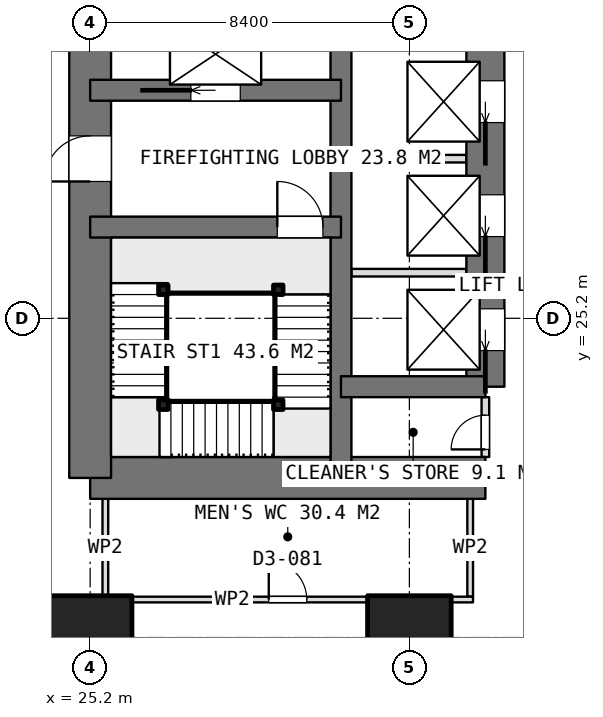
"""IFC4 building model, lengths in metres.
Left out: names, types, materials, properties, quantities, classifications, styles, units other than length and angle.
Written with IfcOpenShell. Run it as: python <this file> out.ifc"""

import sys

from ifc_helpers import new_model, si_unit, direction, frame, frame_2d, origin, origin_2d, place, context, subcontext, project, spatial, rectangle, extrude, element, fill, save


model = new_model("IFC4")
c1 = context("Model", 3, precision=1e-05, world=origin(), true_north=direction((0.0, 1.0)))
c2 = subcontext(c1, "Body", "Model", "MODEL_VIEW")
j1 = project(units=[si_unit("LENGTHUNIT", "METRE"), si_unit("PLANEANGLEUNIT", "RADIAN")], contexts=[c1])
p1 = place(None, origin())
s1 = spatial("IfcSite", under=j1, at=p1, CompositionType="ELEMENT")
p2 = place(p1, origin())
s2 = spatial("IfcBuilding", under=s1, at=p2, CompositionType="ELEMENT")
p3 = place(p2, frame((0.0, 0.0, 74.15)))
s3 = spatial("IfcBuildingStorey", under=s2, at=p3, CompositionType="ELEMENT", Elevation=74.15)
p4 = place(p3, frame((25.2, 21.0, 0.0), z_axis=(0.0, 0.0, 1.0), x_axis=(1.0, 0.0, 0.0)))
e1 = element("IfcWall", 1, at=p4, inside=s3, PredefinedType="SHEAR", context=c2, shape_type="SweptSolid", body=[
    extrude(rectangle(XDim=10.4, YDim=1.1, at=frame_2d((5.2, 0.0))), origin(), (0.0, 0.0, 1.0), 3.75),
])
p5 = place(p3, frame((25.2, 21.0, 0.0), z_axis=(0.0, 0.0, 1.0), x_axis=(0.0, 1.0, 0.0)))
e2 = element("IfcWall", 2, at=p5, inside=s3, PredefinedType="SHEAR", context=c2, shape_type="SweptSolid", body=[
    extrude(rectangle(XDim=25.2, YDim=1.1, at=frame_2d((12.6, 0.0))), origin(), (0.0, 0.0, 1.0), 3.75),
])
p6 = place(p5, frame((7.8, 0.0, 0.0)))
e3 = element("IfcOpeningElement", 3, at=p6, cuts=e2, PredefinedType="OPENING", context=c2, shape_type="SweptSolid", body=[
    extrude(rectangle(XDim=1.2, YDim=2.1, at=frame_2d((0.6, 1.05))), frame((0.0, 0.56, 0.0), z_axis=(0.0, -1.0, 0.0), x_axis=(1.0, 0.0, 0.0)), (0.0, 0.0, 1.0), 1.12),
])
p7 = place(p5, frame((14.25, 0.0, 0.0)))
e4 = element("IfcOpeningElement", 4, at=p7, cuts=e2, PredefinedType="OPENING", context=c2, shape_type="SweptSolid", body=[
    extrude(rectangle(XDim=0.9, YDim=2.1, at=frame_2d((0.45, 1.05))), frame((0.0, 0.56, 0.0), z_axis=(0.0, -1.0, 0.0), x_axis=(1.0, 0.0, 0.0)), (0.0, 0.0, 1.0), 1.12),
])
p8 = place(p5, frame((16.85, 0.0, 0.0)))
e5 = element("IfcOpeningElement", 5, at=p8, cuts=e2, PredefinedType="OPENING", context=c2, shape_type="SweptSolid", body=[
    extrude(rectangle(XDim=0.9, YDim=2.1, at=frame_2d((0.45, 1.05))), frame((0.0, 0.56, 0.0), z_axis=(0.0, -1.0, 0.0), x_axis=(1.0, 0.0, 0.0)), (0.0, 0.0, 1.0), 1.12),
])
p9 = place(p5, frame((19.075, 0.0, 0.0)))
e6 = element("IfcOpeningElement", 6, at=p9, cuts=e2, PredefinedType="OPENING", context=c2, shape_type="SweptSolid", body=[
    extrude(rectangle(XDim=1.2, YDim=2.1, at=frame_2d((0.6, 1.05))), frame((0.0, 0.56, 0.0), z_axis=(0.0, -1.0, 0.0), x_axis=(1.0, 0.0, 0.0)), (0.0, 0.0, 1.0), 1.12),
])
p10 = place(p3, frame((31.8, 21.0, 0.0), z_axis=(0.0, 0.0, 1.0), x_axis=(0.0, 1.0, 0.0)))
e7 = element("IfcWall", 7, at=p10, inside=s3, PredefinedType="SHEAR", context=c2, shape_type="SweptSolid", body=[
    extrude(rectangle(XDim=25.2, YDim=0.55, at=frame_2d((12.6, 0.0))), origin(), (0.0, 0.0, 1.0), 3.75),
])
p11 = place(p3, frame((35.6, 23.4, 0.0), z_axis=(0.0, 0.0, 1.0), x_axis=(0.0, 1.0, 0.0)))
e8 = element("IfcWall", 8, at=p11, inside=s3, PredefinedType="SHEAR", context=c2, shape_type="SweptSolid", body=[
    extrude(rectangle(XDim=18.0, YDim=1.0, at=frame_2d((9.0, 0.0))), origin(), (0.0, 0.0, 1.0), 3.75),
])
p12 = place(p11, frame((0.95, 0.0, 0.0)))
e9 = element("IfcOpeningElement", 9, at=p12, cuts=e8, PredefinedType="OPENING", context=c2, shape_type="SweptSolid", body=[
    extrude(rectangle(XDim=1.1, YDim=2.1, at=frame_2d((0.55, 1.05))), frame((0.0, 0.51, 0.0), z_axis=(0.0, -1.0, 0.0), x_axis=(1.0, 0.0, 0.0)), (0.0, 0.0, 1.0), 1.02),
])
p13 = place(p11, frame((3.95, 0.0, 0.0)))
e10 = element("IfcOpeningElement", 10, at=p13, cuts=e8, PredefinedType="OPENING", context=c2, shape_type="SweptSolid", body=[
    extrude(rectangle(XDim=1.1, YDim=2.1, at=frame_2d((0.55, 1.05))), frame((0.0, 0.51, 0.0), z_axis=(0.0, -1.0, 0.0), x_axis=(1.0, 0.0, 0.0)), (0.0, 0.0, 1.0), 1.02),
])
p14 = place(p11, frame((6.95, 0.0, 0.0)))
e11 = element("IfcOpeningElement", 11, at=p14, cuts=e8, PredefinedType="OPENING", context=c2, shape_type="SweptSolid", body=[
    extrude(rectangle(XDim=1.1, YDim=2.1, at=frame_2d((0.55, 1.05))), frame((0.0, 0.51, 0.0), z_axis=(0.0, -1.0, 0.0), x_axis=(1.0, 0.0, 0.0)), (0.0, 0.0, 1.0), 1.02),
])
p15 = place(p11, frame((9.95, 0.0, 0.0)))
e12 = element("IfcOpeningElement", 12, at=p15, cuts=e8, PredefinedType="OPENING", context=c2, shape_type="SweptSolid", body=[
    extrude(rectangle(XDim=1.1, YDim=2.1, at=frame_2d((0.55, 1.05))), frame((0.0, 0.51, 0.0), z_axis=(0.0, -1.0, 0.0), x_axis=(1.0, 0.0, 0.0)), (0.0, 0.0, 1.0), 1.02),
])
p16 = place(p11, frame((12.95, 0.0, 0.0)))
e13 = element("IfcOpeningElement", 13, at=p16, cuts=e8, PredefinedType="OPENING", context=c2, shape_type="SweptSolid", body=[
    extrude(rectangle(XDim=1.1, YDim=2.1, at=frame_2d((0.55, 1.05))), frame((0.0, 0.51, 0.0), z_axis=(0.0, -1.0, 0.0), x_axis=(1.0, 0.0, 0.0)), (0.0, 0.0, 1.0), 1.02),
])
p17 = place(p11, frame((15.95, 0.0, 0.0)))
e14 = element("IfcOpeningElement", 14, at=p17, cuts=e8, PredefinedType="OPENING", context=c2, shape_type="SweptSolid", body=[
    extrude(rectangle(XDim=1.1, YDim=2.1, at=frame_2d((0.55, 1.05))), frame((0.0, 0.51, 0.0), z_axis=(0.0, -1.0, 0.0), x_axis=(1.0, 0.0, 0.0)), (0.0, 0.0, 1.0), 1.02),
])
p18 = place(p3, frame((31.8, 23.4, 0.0), z_axis=(0.0, 0.0, 1.0), x_axis=(1.0, 0.0, 0.0)))
e15 = element("IfcWall", 15, at=p18, inside=s3, PredefinedType="SHEAR", context=c2, shape_type="SweptSolid", body=[
    extrude(rectangle(XDim=3.8, YDim=0.55, at=frame_2d((1.9, 0.0))), origin(), (0.0, 0.0, 1.0), 3.75),
])
p19 = place(p3, frame((25.2, 27.6, 0.0), z_axis=(0.0, 0.0, 1.0), x_axis=(1.0, 0.0, 0.0)))
e16 = element("IfcWall", 16, at=p19, inside=s3, PredefinedType="SHEAR", context=c2, shape_type="SweptSolid", body=[
    extrude(rectangle(XDim=6.6, YDim=0.55, at=frame_2d((3.3, 0.0))), origin(), (0.0, 0.0, 1.0), 3.75),
])
p20 = place(p19, frame((4.925, 0.0, 0.0)))
e17 = element("IfcOpeningElement", 17, at=p20, cuts=e16, PredefinedType="OPENING", context=c2, shape_type="SweptSolid", body=[
    extrude(rectangle(XDim=1.2, YDim=2.1, at=frame_2d((0.6, 1.05))), frame((0.0, 0.285, 0.0), z_axis=(0.0, -1.0, 0.0), x_axis=(1.0, 0.0, 0.0)), (0.0, 0.0, 1.0), 0.57),
])
p21 = place(p3, frame((25.2, 31.2, 0.0), z_axis=(0.0, 0.0, 1.0), x_axis=(1.0, 0.0, 0.0)))
e18 = element("IfcWall", 18, at=p21, inside=s3, PredefinedType="SHEAR", context=c2, shape_type="SweptSolid", body=[
    extrude(rectangle(XDim=6.6, YDim=0.55, at=frame_2d((3.3, 0.0))), origin(), (0.0, 0.0, 1.0), 3.75),
])
p22 = place(p21, frame((2.65, 0.0, 0.0)))
e19 = element("IfcOpeningElement", 19, at=p22, cuts=e18, PredefinedType="OPENING", context=c2, shape_type="SweptSolid", body=[
    extrude(rectangle(XDim=1.3, YDim=2.1, at=frame_2d((0.65, 1.05))), frame((0.0, 0.285, 0.0), z_axis=(0.0, -1.0, 0.0), x_axis=(1.0, 0.0, 0.0)), (0.0, 0.0, 1.0), 0.57),
])
for number, where, z_axis, x_axis in (
    (20, (25.2, 16.8, 0.0), (0.0, 0.0, 1.0), (1.0, 0.0, 0.0)),
    (21, (33.6, 16.8, 0.0), (0.0, 0.0, 1.0), (1.0, 0.0, 0.0)),
):
    element("IfcColumn", number, at=place(p3, frame(where, z_axis=z_axis, x_axis=x_axis)), inside=s3, PredefinedType="COLUMN", context=c2, shape_type="SweptSolid", body=[
        extrude(rectangle(XDim=2.2, YDim=2.2, at=origin_2d()), origin(), (0.0, 0.0, 1.0), 3.75),
    ])
for number, where, z_axis, x_axis in (
    (22, (32.075, 26.4, 0.0), (0.0, 0.0, 1.0), (1.0, 0.0, 0.0)),
    (23, (32.075, 29.4, 0.0), (0.0, 0.0, 1.0), (1.0, 0.0, 0.0)),
):
    element("IfcWall", number, at=place(p3, frame(where, z_axis=z_axis, x_axis=x_axis)), inside=s3, PredefinedType="PARTITIONING", context=c2, shape_type="SweptSolid", body=[
        extrude(rectangle(XDim=3.025, YDim=0.2, at=frame_2d((1.513, 0.0))), origin(), (0.0, 0.0, 1.0), 3.5),
    ])
p23 = place(p3, frame((35.6, 21.55, 0.0), z_axis=(0.0, 0.0, 1.0), x_axis=(0.0, 1.0, 0.0)))
e24 = element("IfcWall", 24, at=p23, inside=s3, PredefinedType="PARTITIONING", context=c2, shape_type="SweptSolid", body=[
    extrude(rectangle(XDim=1.575, YDim=0.2, at=frame_2d((0.788, 0.0))), origin(), (0.0, 0.0, 1.0), 3.5),
])
p24 = place(p23, frame((0.2, 0.0, 0.0)))
e25 = element("IfcOpeningElement", 25, at=p24, cuts=e24, PredefinedType="OPENING", context=c2, shape_type="SweptSolid", body=[
    extrude(rectangle(XDim=0.9, YDim=2.1, at=frame_2d((0.45, 1.05))), frame((0.0, 0.11, 0.0), z_axis=(0.0, -1.0, 0.0), x_axis=(1.0, 0.0, 0.0)), (0.0, 0.0, 1.0), 0.22),
])
p25 = place(p3, frame((25.525, 17.8, 0.0), z_axis=(0.0, 0.0, 1.0), x_axis=(1.0, 0.0, 0.0)))
e26 = element("IfcWall", 26, at=p25, inside=s3, PredefinedType="PARTITIONING", context=c2, shape_type="SweptSolid", body=[
    extrude(rectangle(XDim=9.75, YDim=0.15, at=frame_2d((4.875, 0.0))), origin(), (0.0, 0.0, 1.0), 3.5),
])
p26 = place(p25, frame((4.375, 0.0, 0.0)))
e27 = element("IfcOpeningElement", 27, at=p26, cuts=e26, PredefinedType="OPENING", context=c2, shape_type="SweptSolid", body=[
    extrude(rectangle(XDim=1.0, YDim=2.1, at=frame_2d((0.5, 1.05))), frame((0.0, 0.085, 0.0), z_axis=(0.0, -1.0, 0.0), x_axis=(1.0, 0.0, 0.0)), (0.0, 0.0, 1.0), 0.17),
])
for number, where, z_axis, x_axis in (
    (28, (25.6, 17.875, 0.0), (0.0, 0.0, 1.0), (0.0, 1.0, 0.0)),
    (29, (35.2, 17.875, 0.0), (0.0, 0.0, 1.0), (0.0, 1.0, 0.0)),
):
    element("IfcWall", number, at=place(p3, frame(where, z_axis=z_axis, x_axis=x_axis)), inside=s3, PredefinedType="PARTITIONING", context=c2, shape_type="SweptSolid", body=[
        extrude(rectangle(XDim=2.575, YDim=0.15, at=frame_2d((1.288, 0.0))), origin(), (0.0, 0.0, 1.0), 3.5),
    ])
for number, where, z_axis, x_axis in (
    (30, (30.15, 25.95, 0.0), (0.0, 0.0, 1.0), (1.0, 0.0, 0.0)),
    (31, (30.15, 22.925, 0.0), (0.0, 0.0, 1.0), (1.0, 0.0, 0.0)),
    (32, (27.125, 22.925, 0.0), (0.0, 0.0, 1.0), (1.0, 0.0, 0.0)),
    (33, (27.125, 25.95, 0.0), (0.0, 0.0, 1.0), (1.0, 0.0, 0.0)),
):
    element("IfcColumn", number, at=place(p3, frame(where, z_axis=z_axis, x_axis=x_axis)), inside=s3, PredefinedType="COLUMN", context=c2, shape_type="SweptSolid", body=[
        extrude(rectangle(XDim=0.25, YDim=0.25, at=origin_2d()), origin(), (0.0, 0.0, 1.0), 3.75),
    ])
p27 = place(p6, origin())
e34 = element("IfcDoor", 34, at=p27, inside=s3, OperationType="SINGLE_SWING_LEFT", PredefinedType="DOOR", context=c2, shape_type="SweptSolid", body=[
    extrude(rectangle(XDim=1.2, YDim=2.1, at=frame_2d((0.6, 1.05))), frame((0.0, 0.025, 0.0), z_axis=(0.0, -1.0, 0.0), x_axis=(1.0, 0.0, 0.0)), (0.0, 0.0, 1.0), 0.05),
])
fill(e3, e34)
p28 = place(p24, origin())
e35 = element("IfcDoor", 35, at=p28, inside=s3, OperationType="SINGLE_SWING_LEFT", PredefinedType="DOOR", context=c2, shape_type="SweptSolid", body=[
    extrude(rectangle(XDim=0.9, YDim=2.1, at=frame_2d((0.45, 1.05))), frame((0.0, 0.025, 0.0), z_axis=(0.0, -1.0, 0.0), x_axis=(1.0, 0.0, 0.0)), (0.0, 0.0, 1.0), 0.05),
])
fill(e25, e35)
p29 = place(p12, origin())
e36 = element("IfcDoor", 36, at=p29, inside=s3, OperationType="SLIDING_TO_LEFT", PredefinedType="USERDEFINED", context=c2, shape_type="SweptSolid", body=[
    extrude(rectangle(XDim=1.1, YDim=2.1, at=frame_2d((0.55, 1.05))), frame((0.0, 0.025, 0.0), z_axis=(0.0, -1.0, 0.0), x_axis=(1.0, 0.0, 0.0)), (0.0, 0.0, 1.0), 0.05),
])
fill(e9, e36)
p30 = place(p13, origin())
e37 = element("IfcDoor", 37, at=p30, inside=s3, OperationType="SLIDING_TO_LEFT", PredefinedType="USERDEFINED", context=c2, shape_type="SweptSolid", body=[
    extrude(rectangle(XDim=1.1, YDim=2.1, at=frame_2d((0.55, 1.05))), frame((0.0, 0.025, 0.0), z_axis=(0.0, -1.0, 0.0), x_axis=(1.0, 0.0, 0.0)), (0.0, 0.0, 1.0), 0.05),
])
fill(e10, e37)
p31 = place(p14, origin())
e38 = element("IfcDoor", 38, at=p31, inside=s3, OperationType="SLIDING_TO_LEFT", PredefinedType="USERDEFINED", context=c2, shape_type="SweptSolid", body=[
    extrude(rectangle(XDim=1.1, YDim=2.1, at=frame_2d((0.55, 1.05))), frame((0.0, 0.025, 0.0), z_axis=(0.0, -1.0, 0.0), x_axis=(1.0, 0.0, 0.0)), (0.0, 0.0, 1.0), 0.05),
])
fill(e11, e38)
p32 = place(p22, origin())
e39 = element("IfcDoor", 39, at=p32, inside=s3, OperationType="SLIDING_TO_LEFT", PredefinedType="USERDEFINED", context=c2, shape_type="SweptSolid", body=[
    extrude(rectangle(XDim=1.3, YDim=2.1, at=frame_2d((0.65, 1.05))), frame((0.0, 0.025, 0.0), z_axis=(0.0, -1.0, 0.0), x_axis=(1.0, 0.0, 0.0)), (0.0, 0.0, 1.0), 0.05),
])
fill(e19, e39)
p33 = place(p26, origin())
e40 = element("IfcDoor", 40, at=p33, inside=s3, OperationType="SINGLE_SWING_LEFT", PredefinedType="DOOR", context=c2, shape_type="SweptSolid", body=[
    extrude(rectangle(XDim=1.0, YDim=2.1, at=frame_2d((0.5, 1.05))), frame((0.0, 0.025, 0.0), z_axis=(0.0, -1.0, 0.0), x_axis=(1.0, 0.0, 0.0)), (0.0, 0.0, 1.0), 0.05),
])
fill(e27, e40)
p34 = place(p20, origin())
e41 = element("IfcDoor", 41, at=p34, inside=s3, OperationType="SINGLE_SWING_RIGHT", PredefinedType="DOOR", context=c2, shape_type="SweptSolid", body=[
    extrude(rectangle(XDim=1.2, YDim=2.1, at=frame_2d((0.6, 1.05))), frame((0.0, 0.025, 0.0), z_axis=(0.0, -1.0, 0.0), x_axis=(1.0, 0.0, 0.0)), (0.0, 0.0, 1.0), 0.05),
])
fill(e17, e41)
save(model, sys.argv[1])
